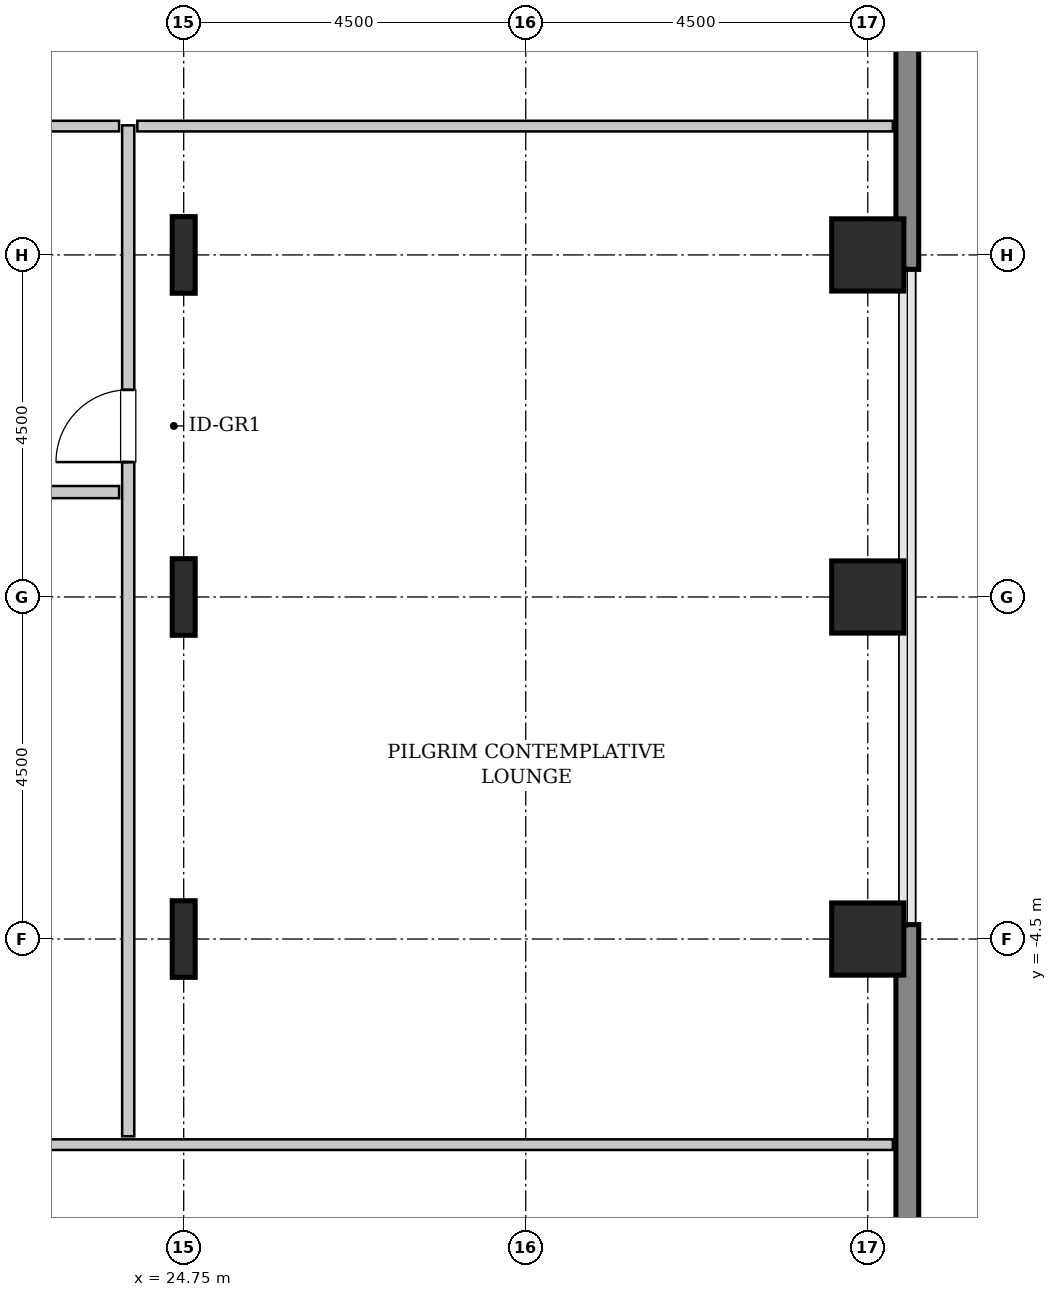
"""IFC4 building model, lengths in metres.
Left out: names, types, materials, properties, quantities, classifications, styles, units other than length and angle.
Written with IfcOpenShell. Run it as: python <this file> out.ifc"""

import sys

from ifc_helpers import new_model, si_unit, direction, frame, frame_2d, origin, origin_2d, place, context, subcontext, project, spatial, rectangle, hollow_rectangle, i_section, extrude, source, transform, mapped, element, fill, save


model = new_model("IFC4")
c1 = context("Model", 3, precision=1e-05, world=origin(), true_north=direction((0.0, 1.0)))
c2 = subcontext(c1, "Body", "Model", "MODEL_VIEW")
j1 = project(units=[si_unit("LENGTHUNIT", "METRE"), si_unit("PLANEANGLEUNIT", "RADIAN")], contexts=[c1])
p1 = place(None, origin())
s1 = spatial("IfcSite", under=j1, at=p1, CompositionType="ELEMENT")
p2 = place(p1, origin())
s2 = spatial("IfcBuilding", under=s1, at=p2, CompositionType="ELEMENT")
p3 = place(p2, frame((0.0, 0.0, 44.4)))
s3 = spatial("IfcBuildingStorey", under=s2, at=p3, CompositionType="ELEMENT", Elevation=44.4)
m1 = source(origin(), c2, "Body", "SweptSolid", [
    extrude(i_section(OverallWidth=0.302, OverallDepth=1.008, WebThickness=0.021, FlangeThickness=0.04, FilletRadius=0.03, at=origin_2d()), origin(), (0.0, 0.0, 1.0), 3.8),
])
for number, where, z_axis, x_axis in (
    (1, (24.75, -4.5, 0.0), (0.0, 0.0, 1.0), (1.0, 0.0, 0.0)),
    (2, (24.75, 0.0, 0.0), (0.0, 0.0, 1.0), (1.0, 0.0, 0.0)),
    (3, (24.75, 4.5, 0.0), (0.0, 0.0, 1.0), (1.0, 0.0, 0.0)),
):
    element("IfcColumn", number, at=place(p3, frame(where, z_axis=z_axis, x_axis=x_axis)), inside=s3, PredefinedType="COLUMN", context=c2, shape_type="MappedRepresentation", body=[
        mapped(m1, transform((0.0, 0.0, 0.0), x_axis=(1.0, 0.0, 0.0), y_axis=(0.0, 1.0, 0.0), z_axis=(0.0, 0.0, 1.0), scale=1.0)),
    ])
m2 = source(origin(), c2, "Body", "SweptSolid", [
    extrude(hollow_rectangle(XDim=0.95, YDim=0.95, WallThickness=0.045, InnerFilletRadius=0.045, OuterFilletRadius=0.09, at=origin_2d()), origin(), (0.0, 0.0, 1.0), 3.8),
])
for number, where, z_axis, x_axis in (
    (4, (33.75, -4.5, 0.0), (0.0, 0.0, 1.0), (1.0, 0.0, 0.0)),
    (5, (33.75, 0.0, 0.0), (0.0, 0.0, 1.0), (1.0, 0.0, 0.0)),
    (6, (33.75, 4.5, 0.0), (0.0, 0.0, 1.0), (1.0, 0.0, 0.0)),
):
    element("IfcColumn", number, at=place(p3, frame(where, z_axis=z_axis, x_axis=x_axis)), inside=s3, PredefinedType="COLUMN", context=c2, shape_type="MappedRepresentation", body=[
        mapped(m2, transform((0.0, 0.0, 0.0), x_axis=(1.0, 0.0, 0.0), y_axis=(0.0, 1.0, 0.0), z_axis=(0.0, 0.0, 1.0), scale=1.0)),
    ])
m3 = source(origin(), c2, "Body", "SweptSolid", [
    extrude(rectangle(XDim=4.88, YDim=0.3, at=frame_2d((2.44, 0.0))), origin(), (0.0, 0.0, 1.0), 3.55),
])
for number, where, z_axis, x_axis in (
    (7, (34.27, -9.19, 0.0), (0.0, 0.0, 1.0), (0.0, 1.0, 0.0)),
    (8, (34.27, 4.31, 0.0), (0.0, 0.0, 1.0), (0.0, 1.0, 0.0)),
):
    element("IfcWall", number, at=place(p3, frame(where, z_axis=z_axis, x_axis=x_axis)), inside=s3, PredefinedType="SHEAR", context=c2, shape_type="MappedRepresentation", body=[
        mapped(m3, transform((0.0, 0.0, 0.0), x_axis=(1.0, 0.0, 0.0), y_axis=(0.0, 1.0, 0.0), z_axis=(0.0, 0.0, 1.0), scale=1.0)),
    ])
m4 = source(origin(), c2, "Body", "SweptSolid", [
    extrude(rectangle(XDim=20.22, YDim=0.14, at=frame_2d((10.11, 0.0))), origin(), (0.0, 0.0, 1.0), 3.535),
])
p4 = place(p3, frame((13.86, -7.205, 0.0), z_axis=(0.0, 0.0, 1.0), x_axis=(1.0, 0.0, 0.0)))
e9 = element("IfcWall", 9, at=p4, inside=s3, PredefinedType="PARTITIONING", context=c2, shape_type="MappedRepresentation", body=[
    mapped(m4, transform((0.0, 0.0, 0.0), x_axis=(1.0, 0.0, 0.0), y_axis=(0.0, 1.0, 0.0), z_axis=(0.0, 0.0, 1.0), scale=1.0)),
])
m5 = source(origin(), c2, "Body", "SweptSolid", [
    extrude(rectangle(XDim=13.3, YDim=0.16, at=frame_2d((6.65, 0.0))), origin(), (0.0, 0.0, 1.0), 3.535),
])
p5 = place(p3, frame((24.02, -7.095, 0.0), z_axis=(0.0, 0.0, 1.0), x_axis=(0.0, 1.0, 0.0)))
e10 = element("IfcWall", 10, at=p5, inside=s3, PredefinedType="PARTITIONING", context=c2, shape_type="MappedRepresentation", body=[
    mapped(m5, transform((0.0, 0.0, 0.0), x_axis=(1.0, 0.0, 0.0), y_axis=(0.0, 1.0, 0.0), z_axis=(0.0, 0.0, 1.0), scale=1.0)),
])
p6 = place(p5, frame((8.87, 0.0, 0.0)))
e11 = element("IfcOpeningElement", 11, at=p6, cuts=e10, PredefinedType="OPENING", context=c2, shape_type="SweptSolid", body=[
    extrude(rectangle(XDim=0.95, YDim=2.1, at=frame_2d((0.475, 1.05))), frame((0.0, 0.09, 0.0), z_axis=(0.0, -1.0, 0.0), x_axis=(1.0, 0.0, 0.0)), (0.0, 0.0, 1.0), 0.18),
])
m6 = source(origin(), c2, "Body", "SweptSolid", [
    extrude(rectangle(XDim=10.17, YDim=0.14, at=frame_2d((5.085, 0.0))), origin(), (0.0, 0.0, 1.0), 3.535),
])
p7 = place(p3, frame((13.73, 6.195, 0.0), z_axis=(0.0, 0.0, 1.0), x_axis=(1.0, 0.0, 0.0)))
e12 = element("IfcWall", 12, at=p7, inside=s3, PredefinedType="PARTITIONING", context=c2, shape_type="MappedRepresentation", body=[
    mapped(m6, transform((0.0, 0.0, 0.0), x_axis=(1.0, 0.0, 0.0), y_axis=(0.0, 1.0, 0.0), z_axis=(0.0, 0.0, 1.0), scale=1.0)),
])
m7 = source(origin(), c2, "Body", "SweptSolid", [
    extrude(rectangle(XDim=9.94, YDim=0.14, at=frame_2d((4.97, 0.0))), origin(), (0.0, 0.0, 1.0), 3.535),
])
p8 = place(p3, frame((24.14, 6.195, 0.0), z_axis=(0.0, 0.0, 1.0), x_axis=(1.0, 0.0, 0.0)))
e13 = element("IfcWall", 13, at=p8, inside=s3, PredefinedType="PARTITIONING", context=c2, shape_type="MappedRepresentation", body=[
    mapped(m7, transform((0.0, 0.0, 0.0), x_axis=(1.0, 0.0, 0.0), y_axis=(0.0, 1.0, 0.0), z_axis=(0.0, 0.0, 1.0), scale=1.0)),
])
m8 = source(origin(), c2, "Body", "SweptSolid", [
    extrude(rectangle(XDim=5.045, YDim=0.16, at=frame_2d((2.522, 0.0))), origin(), (0.0, 0.0, 1.0), 3.535),
])
p9 = place(p3, frame((18.855, 1.38, 0.0), z_axis=(0.0, 0.0, 1.0), x_axis=(1.0, 0.0, 0.0)))
e14 = element("IfcWall", 14, at=p9, inside=s3, PredefinedType="PARTITIONING", context=c2, shape_type="MappedRepresentation", body=[
    mapped(m8, transform((0.0, 0.0, 0.0), x_axis=(1.0, 0.0, 0.0), y_axis=(0.0, 1.0, 0.0), z_axis=(0.0, 0.0, 1.0), scale=1.0)),
])
p10 = place(p9, frame((2.048, 0.0, 0.0)))
e15 = element("IfcOpeningElement", 15, at=p10, cuts=e14, PredefinedType="OPENING", context=c2, shape_type="SweptSolid", body=[
    extrude(rectangle(XDim=0.95, YDim=2.1, at=frame_2d((0.475, 1.05))), frame((0.0, 0.09, 0.0), z_axis=(0.0, -1.0, 0.0), x_axis=(1.0, 0.0, 0.0)), (0.0, 0.0, 1.0), 0.18),
])
m9 = source(origin(), c2, "Body", "SweptSolid", [
    extrude(rectangle(XDim=0.95, YDim=2.1, at=frame_2d((0.475, 1.05))), frame((0.0, 0.025, 0.0), z_axis=(0.0, -1.0, 0.0), x_axis=(1.0, 0.0, 0.0)), (0.0, 0.0, 1.0), 0.05),
])
p11 = place(p6, origin())
e16 = element("IfcDoor", 16, at=p11, inside=s3, OperationType="SINGLE_SWING_LEFT", PredefinedType="DOOR", context=c2, shape_type="MappedRepresentation", body=[
    mapped(m9, transform((0.0, 0.0, 0.0), x_axis=(1.0, 0.0, 0.0), y_axis=(0.0, 1.0, 0.0), z_axis=(0.0, 0.0, 1.0), scale=1.0)),
])
fill(e11, e16)
save(model, sys.argv[1])
